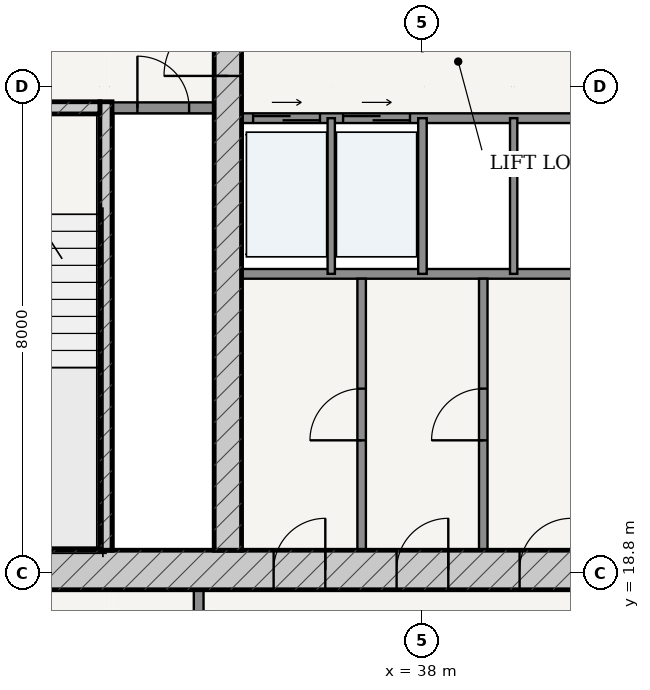
"""IFC4 building model, lengths in metres.
Left out: names, types, materials, properties, quantities, classifications, styles, units other than length and angle.
Written with IfcOpenShell. Run it as: python <this file> out.ifc"""

import sys

from ifc_helpers import new_model, si_unit, direction, frame, frame_2d, origin, place, context, subcontext, project, spatial, rectangle, extrude, source, transform, mapped, element, fill, save


model = new_model("IFC4")
c1 = context("Model", 3, precision=1e-05, world=origin(), true_north=direction((-0.2419218956, 0.970295726276)))
c2 = subcontext(c1, "Body", "Model", "MODEL_VIEW")
j1 = project(units=[si_unit("LENGTHUNIT", "METRE"), si_unit("PLANEANGLEUNIT", "RADIAN")], contexts=[c1])
p1 = place(None, origin())
s1 = spatial("IfcSite", under=j1, at=p1, CompositionType="ELEMENT")
p2 = place(p1, origin())
s2 = spatial("IfcBuilding", under=s1, at=p2, CompositionType="ELEMENT")
p3 = place(p2, frame((0.0, 0.0, 135.4)))
s3 = spatial("IfcBuildingStorey", under=s2, at=p3, CompositionType="ELEMENT", Elevation=135.4)
p4 = place(p3, frame((28.725, 18.85, 0.0), z_axis=(0.0, 0.0, 1.0), x_axis=(1.0, 0.0, 0.0)))
e1 = element("IfcWall", 1, at=p4, inside=s3, PredefinedType="SHEAR", context=c2, shape_type="SweptSolid", body=[
    extrude(rectangle(XDim=18.55, YDim=0.65, at=frame_2d((9.275, 0.0))), origin(), (0.0, 0.0, 1.0), 3.33),
])
p5 = place(p4, frame((6.827, 0.0, 0.0)))
e2 = element("IfcOpeningElement", 2, at=p5, cuts=e1, PredefinedType="OPENING", context=c2, shape_type="SweptSolid", body=[
    extrude(rectangle(XDim=0.85, YDim=2.1, at=frame_2d((0.425, 1.05))), frame((0.0, 0.335, 0.0), z_axis=(0.0, -1.0, 0.0), x_axis=(1.0, 0.0, 0.0)), (0.0, 0.0, 1.0), 0.67),
])
p6 = place(p4, frame((8.85, 0.0, 0.0)))
e3 = element("IfcOpeningElement", 3, at=p6, cuts=e1, PredefinedType="OPENING", context=c2, shape_type="SweptSolid", body=[
    extrude(rectangle(XDim=0.85, YDim=2.1, at=frame_2d((0.425, 1.05))), frame((0.0, 0.335, 0.0), z_axis=(0.0, -1.0, 0.0), x_axis=(1.0, 0.0, 0.0)), (0.0, 0.0, 1.0), 0.67),
])
p7 = place(p4, frame((10.873, 0.0, 0.0)))
e4 = element("IfcOpeningElement", 4, at=p7, cuts=e1, PredefinedType="OPENING", context=c2, shape_type="SweptSolid", body=[
    extrude(rectangle(XDim=0.85, YDim=2.1, at=frame_2d((0.425, 1.05))), frame((0.0, 0.335, 0.0), z_axis=(0.0, -1.0, 0.0), x_axis=(1.0, 0.0, 0.0)), (0.0, 0.0, 1.0), 0.67),
])
p8 = place(p3, frame((32.795, 19.175, 0.0), z_axis=(0.0, 0.0, 1.0), x_axis=(0.0, 1.0, 0.0)))
e5 = element("IfcWall", 5, at=p8, inside=s3, PredefinedType="SOLIDWALL", context=c2, shape_type="SweptSolid", body=[
    extrude(rectangle(XDim=7.375, YDim=0.2, at=frame_2d((3.688, 0.0))), origin(), (0.0, 0.0, 1.0), 3.33),
])
p9 = place(p3, frame((29.375, 26.45, 0.0), z_axis=(0.0, 0.0, 1.0), x_axis=(1.0, 0.0, 0.0)))
e6 = element("IfcWall", 6, at=p9, inside=s3, PredefinedType="SOLIDWALL", context=c2, shape_type="SweptSolid", body=[
    extrude(rectangle(XDim=3.32, YDim=0.2, at=frame_2d((1.66, 0.0))), origin(), (0.0, 0.0, 1.0), 3.33),
])
p10 = place(p9, frame((1.185, 0.0, 0.0)))
e7 = element("IfcOpeningElement", 7, at=p10, cuts=e6, PredefinedType="OPENING", context=c2, shape_type="SweptSolid", body=[
    extrude(rectangle(XDim=0.95, YDim=2.15, at=frame_2d((0.475, 1.075))), frame((0.0, 0.11, 0.0), z_axis=(0.0, -1.0, 0.0), x_axis=(1.0, 0.0, 0.0)), (0.0, 0.0, 1.0), 0.22),
])
p11 = place(p3, frame((34.8, 19.175, 0.0), z_axis=(0.0, 0.0, 1.0), x_axis=(0.0, 1.0, 0.0)))
e8 = element("IfcWall", 8, at=p11, inside=s3, PredefinedType="SHEAR", context=c2, shape_type="SweptSolid", body=[
    extrude(rectangle(XDim=15.25, YDim=0.45, at=frame_2d((7.625, 0.0))), origin(), (0.0, 0.0, 1.0), 3.33),
])
p12 = place(p11, frame((7.8, 0.0, 0.0)))
e9 = element("IfcOpeningElement", 9, at=p12, cuts=e8, PredefinedType="OPENING", context=c2, shape_type="SweptSolid", body=[
    extrude(rectangle(XDim=1.05, YDim=2.15, at=frame_2d((0.525, 1.075))), frame((0.0, 0.235, 0.0), z_axis=(0.0, -1.0, 0.0), x_axis=(1.0, 0.0, 0.0)), (0.0, 0.0, 1.0), 0.47),
])
p13 = place(p3, frame((32.9, 26.45, 0.0), z_axis=(0.0, 0.0, 1.0), x_axis=(1.0, 0.0, 0.0)))
e10 = element("IfcWall", 10, at=p13, inside=s3, PredefinedType="PARTITIONING", context=c2, shape_type="SweptSolid", body=[
    extrude(rectangle(XDim=1.675, YDim=0.18, at=frame_2d((0.837, 0.0))), origin(), (0.0, 0.0, 1.0), 3.33),
])
p14 = place(p13, frame((0.413, 0.0, 0.0)))
e11 = element("IfcOpeningElement", 11, at=p14, cuts=e10, PredefinedType="OPENING", context=c2, shape_type="SweptSolid", body=[
    extrude(rectangle(XDim=0.85, YDim=2.1, at=frame_2d((0.425, 1.05))), frame((0.0, 0.1, 0.0), z_axis=(0.0, -1.0, 0.0), x_axis=(1.0, 0.0, 0.0)), (0.0, 0.0, 1.0), 0.2),
])
p15 = place(p3, frame((35.025, 26.28, 0.0), z_axis=(0.0, 0.0, 1.0), x_axis=(1.0, 0.0, 0.0)))
e12 = element("IfcWall", 12, at=p15, inside=s3, PredefinedType="PARTITIONING", context=c2, shape_type="SweptSolid", body=[
    extrude(rectangle(XDim=5.95, YDim=0.16, at=frame_2d((2.975, 0.0))), origin(), (0.0, 0.0, 1.0), 3.33),
])
p16 = place(p15, frame((0.19, 0.0, 0.0)))
e13 = element("IfcOpeningElement", 13, at=p16, cuts=e12, PredefinedType="OPENING", context=c2, shape_type="SweptSolid", body=[
    extrude(rectangle(XDim=1.1, YDim=2.2, at=frame_2d((0.55, 1.1))), frame((0.0, 0.09, 0.0), z_axis=(0.0, -1.0, 0.0), x_axis=(1.0, 0.0, 0.0)), (0.0, 0.0, 1.0), 0.18),
])
p17 = place(p15, frame((1.67, 0.0, 0.0)))
e14 = element("IfcOpeningElement", 14, at=p17, cuts=e12, PredefinedType="OPENING", context=c2, shape_type="SweptSolid", body=[
    extrude(rectangle(XDim=1.1, YDim=2.2, at=frame_2d((0.55, 1.1))), frame((0.0, 0.09, 0.0), z_axis=(0.0, -1.0, 0.0), x_axis=(1.0, 0.0, 0.0)), (0.0, 0.0, 1.0), 0.18),
])
p18 = place(p3, frame((35.025, 23.72, 0.0), z_axis=(0.0, 0.0, 1.0), x_axis=(1.0, 0.0, 0.0)))
e15 = element("IfcWall", 15, at=p18, inside=s3, PredefinedType="PARTITIONING", context=c2, shape_type="SweptSolid", body=[
    extrude(rectangle(XDim=5.95, YDim=0.16, at=frame_2d((2.975, 0.0))), origin(), (0.0, 0.0, 1.0), 3.33),
])
p19 = place(p3, frame((36.5, 23.72, 0.0), z_axis=(0.0, 0.0, 1.0), x_axis=(0.0, 1.0, 0.0)))
e16 = element("IfcWall", 16, at=p19, inside=s3, PredefinedType="PARTITIONING", context=c2, shape_type="SweptSolid", body=[
    extrude(rectangle(XDim=2.56, YDim=0.12, at=frame_2d((1.28, 0.0))), origin(), (0.0, 0.0, 1.0), 3.33),
])
p20 = place(p3, frame((38.0, 23.72, 0.0), z_axis=(0.0, 0.0, 1.0), x_axis=(0.0, 1.0, 0.0)))
e17 = element("IfcWall", 17, at=p20, inside=s3, PredefinedType="PARTITIONING", context=c2, shape_type="SweptSolid", body=[
    extrude(rectangle(XDim=2.56, YDim=0.14, at=frame_2d((1.28, 0.0))), origin(), (0.0, 0.0, 1.0), 3.33),
])
p21 = place(p3, frame((39.5, 23.72, 0.0), z_axis=(0.0, 0.0, 1.0), x_axis=(0.0, 1.0, 0.0)))
e18 = element("IfcWall", 18, at=p21, inside=s3, PredefinedType="PARTITIONING", context=c2, shape_type="SweptSolid", body=[
    extrude(rectangle(XDim=2.56, YDim=0.12, at=frame_2d((1.28, 0.0))), origin(), (0.0, 0.0, 1.0), 3.33),
])
p22 = place(p3, frame((37.0, 19.175, 0.0), z_axis=(0.0, 0.0, 1.0), x_axis=(0.0, 1.0, 0.0)))
e19 = element("IfcWall", 19, at=p22, inside=s3, PredefinedType="PARTITIONING", context=c2, shape_type="SweptSolid", body=[
    extrude(rectangle(XDim=4.465, YDim=0.14, at=frame_2d((2.232, 0.0))), origin(), (0.0, 0.0, 1.0), 3.33),
])
p23 = place(p22, frame((1.808, 0.0, 0.0)))
e20 = element("IfcOpeningElement", 20, at=p23, cuts=e19, PredefinedType="OPENING", context=c2, shape_type="SweptSolid", body=[
    extrude(rectangle(XDim=0.85, YDim=2.1, at=frame_2d((0.425, 1.05))), frame((0.0, 0.08, 0.0), z_axis=(0.0, -1.0, 0.0), x_axis=(1.0, 0.0, 0.0)), (0.0, 0.0, 1.0), 0.16),
])
p24 = place(p3, frame((39.0, 19.175, 0.0), z_axis=(0.0, 0.0, 1.0), x_axis=(0.0, 1.0, 0.0)))
e21 = element("IfcWall", 21, at=p24, inside=s3, PredefinedType="PARTITIONING", context=c2, shape_type="SweptSolid", body=[
    extrude(rectangle(XDim=4.465, YDim=0.14, at=frame_2d((2.232, 0.0))), origin(), (0.0, 0.0, 1.0), 3.33),
])
p25 = place(p24, frame((1.808, 0.0, 0.0)))
e22 = element("IfcOpeningElement", 22, at=p25, cuts=e21, PredefinedType="OPENING", context=c2, shape_type="SweptSolid", body=[
    extrude(rectangle(XDim=0.85, YDim=2.1, at=frame_2d((0.425, 1.05))), frame((0.0, 0.08, 0.0), z_axis=(0.0, -1.0, 0.0), x_axis=(1.0, 0.0, 0.0)), (0.0, 0.0, 1.0), 0.16),
])
p26 = place(p3, frame((34.32, 16.675, 0.0), z_axis=(0.0, 0.0, 1.0), x_axis=(0.0, 1.0, 0.0)))
e23 = element("IfcWall", 23, at=p26, inside=s3, PredefinedType="PARTITIONING", context=c2, shape_type="SweptSolid", body=[
    extrude(rectangle(XDim=1.85, YDim=0.16, at=frame_2d((0.925, 0.0))), origin(), (0.0, 0.0, 1.0), 3.33),
])
p27 = place(p26, frame((0.435, 0.0, 0.0)))
e24 = element("IfcOpeningElement", 24, at=p27, cuts=e23, PredefinedType="OPENING", context=c2, shape_type="SweptSolid", body=[
    extrude(rectangle(XDim=0.98, YDim=2.2, at=frame_2d((0.49, 1.1))), frame((0.0, 0.09, 0.0), z_axis=(0.0, -1.0, 0.0), x_axis=(1.0, 0.0, 0.0)), (0.0, 0.0, 1.0), 0.18),
])
m1 = source(origin(), c2, "Body", "SweptSolid", [
    extrude(rectangle(XDim=1.05, YDim=2.15, at=frame_2d((0.525, 1.075))), frame((0.0, 0.025, 0.0), z_axis=(0.0, -1.0, 0.0), x_axis=(1.0, 0.0, 0.0)), (0.0, 0.0, 1.0), 0.05),
])
p28 = place(p12, origin())
e25 = element("IfcDoor", 25, at=p28, inside=s3, OperationType="SINGLE_SWING_LEFT", PredefinedType="DOOR", context=c2, shape_type="MappedRepresentation", body=[
    mapped(m1, transform((0.0, 0.0, 0.0), scale=1.0)),
])
fill(e9, e25)
m2 = source(origin(), c2, "Body", "SweptSolid", [
    extrude(rectangle(XDim=0.85, YDim=2.1, at=frame_2d((0.425, 1.05))), frame((0.0, 0.025, 0.0), z_axis=(0.0, -1.0, 0.0), x_axis=(1.0, 0.0, 0.0)), (0.0, 0.0, 1.0), 0.05),
])
p29 = place(p14, origin())
e26 = element("IfcDoor", 26, at=p29, inside=s3, OperationType="SINGLE_SWING_LEFT", PredefinedType="DOOR", context=c2, shape_type="MappedRepresentation", body=[
    mapped(m2, transform((0.0, 0.0, 0.0), scale=1.0)),
])
fill(e11, e26)
p30 = place(p5, origin())
e27 = element("IfcDoor", 27, at=p30, inside=s3, OperationType="SINGLE_SWING_RIGHT", PredefinedType="DOOR", context=c2, shape_type="MappedRepresentation", body=[
    mapped(m2, transform((0.0, 0.0, 0.0), scale=1.0)),
])
fill(e2, e27)
p31 = place(p6, origin())
e28 = element("IfcDoor", 28, at=p31, inside=s3, OperationType="SINGLE_SWING_RIGHT", PredefinedType="DOOR", context=c2, shape_type="MappedRepresentation", body=[
    mapped(m2, transform((0.0, 0.0, 0.0), scale=1.0)),
])
fill(e3, e28)
p32 = place(p7, origin())
e29 = element("IfcDoor", 29, at=p32, inside=s3, OperationType="SINGLE_SWING_RIGHT", PredefinedType="DOOR", context=c2, shape_type="MappedRepresentation", body=[
    mapped(m2, transform((0.0, 0.0, 0.0), scale=1.0)),
])
fill(e4, e29)
p33 = place(p23, origin())
e30 = element("IfcDoor", 30, at=p33, inside=s3, OperationType="SINGLE_SWING_LEFT", PredefinedType="DOOR", context=c2, shape_type="MappedRepresentation", body=[
    mapped(m2, transform((0.0, 0.0, 0.0), scale=1.0)),
])
fill(e20, e30)
p34 = place(p25, origin())
e31 = element("IfcDoor", 31, at=p34, inside=s3, OperationType="SINGLE_SWING_LEFT", PredefinedType="DOOR", context=c2, shape_type="MappedRepresentation", body=[
    mapped(m2, transform((0.0, 0.0, 0.0), scale=1.0)),
])
fill(e22, e31)
m3 = source(origin(), c2, "Body", "SweptSolid", [
    extrude(rectangle(XDim=1.1, YDim=2.2, at=frame_2d((0.55, 1.1))), frame((0.0, 0.025, 0.0), z_axis=(0.0, -1.0, 0.0), x_axis=(1.0, 0.0, 0.0)), (0.0, 0.0, 1.0), 0.05),
])
p35 = place(p16, origin())
e32 = element("IfcDoor", 32, at=p35, inside=s3, OperationType="DOUBLE_DOOR_SLIDING", PredefinedType="DOOR", context=c2, shape_type="MappedRepresentation", body=[
    mapped(m3, transform((0.0, 0.0, 0.0), scale=1.0)),
])
fill(e13, e32)
p36 = place(p17, origin())
e33 = element("IfcDoor", 33, at=p36, inside=s3, OperationType="DOUBLE_DOOR_SLIDING", PredefinedType="DOOR", context=c2, shape_type="MappedRepresentation", body=[
    mapped(m3, transform((0.0, 0.0, 0.0), scale=1.0)),
])
fill(e14, e33)
save(model, sys.argv[1])
